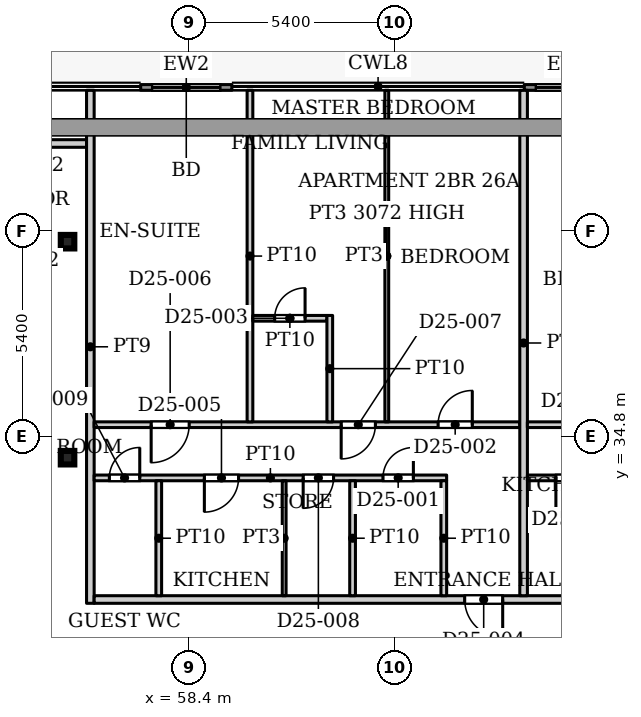
"""IFC4 building model, lengths in metres.
Left out: names, types, materials, properties, quantities, classifications, styles, units other than length and angle.
Written with IfcOpenShell. Run it as: python <this file> out.ifc"""

import sys

from ifc_helpers import new_model, si_unit, direction, frame, frame_2d, origin, origin_2d, place, context, subcontext, project, spatial, rectangle, hollow_rectangle, extrude, source, transform, mapped, element, fill, save


model = new_model("IFC4")
c1 = context("Model", 3, precision=1e-05, world=origin(), true_north=direction((0.0, 1.0)))
c2 = subcontext(c1, "Body", "Model", "MODEL_VIEW")
j1 = project(units=[si_unit("LENGTHUNIT", "METRE"), si_unit("PLANEANGLEUNIT", "RADIAN")], contexts=[c1])
p1 = place(None, origin())
s1 = spatial("IfcSite", under=j1, at=p1, CompositionType="ELEMENT")
p2 = place(p1, origin())
s2 = spatial("IfcBuilding", under=s1, at=p2, CompositionType="ELEMENT")
p3 = place(p2, frame((0.0, 0.0, 113.6)))
s3 = spatial("IfcBuildingStorey", under=s2, at=p3, CompositionType="ELEMENT", Elevation=113.6)
for number, where, z_axis, x_axis in (
    (1, (55.2, 34.232, 0.0), (0.0, 0.0, 1.0), (1.0, 0.0, 0.0)),
    (2, (55.2, 39.916, 0.0), (0.0, 0.0, 1.0), (1.0, 0.0, 0.0)),
):
    element("IfcColumn", number, at=place(p3, frame(where, z_axis=z_axis, x_axis=x_axis)), inside=s3, PredefinedType="COLUMN", context=c2, shape_type="SweptSolid", body=[
        extrude(hollow_rectangle(XDim=0.356, YDim=0.356, WallThickness=0.016, InnerFilletRadius=0.016, OuterFilletRadius=0.032, at=origin_2d()), origin(), (0.0, 0.0, 1.0), 3.9),
    ])
p4 = place(p3, frame((57.124, 43.975, 0.0), z_axis=(0.0, 0.0, 1.0), x_axis=(1.0, 0.0, 0.0)))
e3 = element("IfcWall", 3, at=p4, inside=s3, PredefinedType="SOLIDWALL", context=c2, shape_type="SweptSolid", body=[
    extrude(rectangle(XDim=2.4, YDim=0.15, at=frame_2d((1.2, 0.0))), origin(), (0.0, 0.0, 1.0), 3.75),
])
p5 = place(p4, frame((0.3, 0.0, 0.0)))
e4 = element("IfcOpeningElement", 4, at=p5, cuts=e3, PredefinedType="OPENING", context=c2, shape_type="SweptSolid", body=[
    extrude(rectangle(XDim=1.8, YDim=2.4, at=frame_2d((0.9, 1.2))), frame((0.0, 0.085, 0.0), z_axis=(0.0, -1.0, 0.0), x_axis=(1.0, 0.0, 0.0)), (0.0, 0.0, 1.0), 0.17),
])
p6 = place(p3, frame((67.218, 43.975, 0.0), z_axis=(0.0, 0.0, 1.0), x_axis=(1.0, 0.0, 0.0)))
e5 = element("IfcWall", 5, at=p6, inside=s3, PredefinedType="SOLIDWALL", context=c2, shape_type="SweptSolid", body=[
    extrude(rectangle(XDim=2.4, YDim=0.15, at=frame_2d((1.2, 0.0))), origin(), (0.0, 0.0, 1.0), 3.75),
])
p7 = place(p6, frame((0.3, 0.0, 0.0)))
e6 = element("IfcOpeningElement", 6, at=p7, cuts=e5, PredefinedType="OPENING", context=c2, shape_type="SweptSolid", body=[
    extrude(rectangle(XDim=1.8, YDim=2.4, at=frame_2d((0.9, 1.2))), frame((0.0, 0.085, 0.0), z_axis=(0.0, -1.0, 0.0), x_axis=(1.0, 0.0, 0.0)), (0.0, 0.0, 1.0), 0.17),
])
p8 = place(p3, frame((53.5, 42.5, 0.0), z_axis=(0.0, 0.0, 1.0), x_axis=(1.0, 0.0, 0.0)))
e7 = element("IfcWall", 7, at=p8, inside=s3, PredefinedType="PARTITIONING", context=c2, shape_type="SweptSolid", body=[
    extrude(rectangle(XDim=2.2, YDim=0.2, at=frame_2d((1.1, 0.0))), origin(), (0.0, 0.0, 1.0), 3.6),
])
p9 = place(p3, frame((55.8, 30.4, 0.0), z_axis=(0.0, 0.0, 1.0), x_axis=(0.0, 1.0, 0.0)))
e8 = element("IfcWall", 8, at=p9, inside=s3, PredefinedType="PARTITIONING", context=c2, shape_type="SweptSolid", body=[
    extrude(rectangle(XDim=13.5, YDim=0.2, at=frame_2d((6.75, 0.0))), origin(), (0.0, 0.0, 1.0), 3.6),
])
p10 = place(p3, frame((55.9, 30.5, 0.0), z_axis=(0.0, 0.0, 1.0), x_axis=(1.0, 0.0, 0.0)))
e9 = element("IfcWall", 9, at=p10, inside=s3, PredefinedType="PARTITIONING", context=c2, shape_type="SweptSolid", body=[
    extrude(rectangle(XDim=42.2, YDim=0.2, at=frame_2d((21.1, 0.0))), origin(), (0.0, 0.0, 1.0), 3.6),
])
p11 = place(p10, frame((9.75, 0.0, 0.0)))
e10 = element("IfcOpeningElement", 10, at=p11, cuts=e9, PredefinedType="OPENING", context=c2, shape_type="SweptSolid", body=[
    extrude(rectangle(XDim=1.0, YDim=2.1, at=frame_2d((0.5, 1.05))), frame((0.0, 0.11, 0.0), z_axis=(0.0, -1.0, 0.0), x_axis=(1.0, 0.0, 0.0)), (0.0, 0.0, 1.0), 0.22),
])
p12 = place(p10, frame((18.6, 0.0, 0.0)))
e11 = element("IfcOpeningElement", 11, at=p12, cuts=e9, PredefinedType="OPENING", context=c2, shape_type="SweptSolid", body=[
    extrude(rectangle(XDim=1.0, YDim=2.1, at=frame_2d((0.5, 1.05))), frame((0.0, 0.11, 0.0), z_axis=(0.0, -1.0, 0.0), x_axis=(1.0, 0.0, 0.0)), (0.0, 0.0, 1.0), 0.22),
])
p13 = place(p10, frame((23.4, 0.0, 0.0)))
e12 = element("IfcOpeningElement", 12, at=p13, cuts=e9, PredefinedType="OPENING", context=c2, shape_type="SweptSolid", body=[
    extrude(rectangle(XDim=1.0, YDim=2.1, at=frame_2d((0.5, 1.05))), frame((0.0, 0.11, 0.0), z_axis=(0.0, -1.0, 0.0), x_axis=(1.0, 0.0, 0.0)), (0.0, 0.0, 1.0), 0.22),
])
p14 = place(p10, frame((40.2, 0.0, 0.0)))
e13 = element("IfcOpeningElement", 13, at=p14, cuts=e9, PredefinedType="OPENING", context=c2, shape_type="SweptSolid", body=[
    extrude(rectangle(XDim=1.0, YDim=2.1, at=frame_2d((0.5, 1.05))), frame((0.0, 0.11, 0.0), z_axis=(0.0, -1.0, 0.0), x_axis=(1.0, 0.0, 0.0)), (0.0, 0.0, 1.0), 0.22),
])
p15 = place(p3, frame((55.9, 33.7, 0.0), z_axis=(0.0, 0.0, 1.0), x_axis=(1.0, 0.0, 0.0)))
e14 = element("IfcWall", 14, at=p15, inside=s3, PredefinedType="PARTITIONING", context=c2, shape_type="SweptSolid", body=[
    extrude(rectangle(XDim=9.275, YDim=0.15, at=frame_2d((4.638, 0.0))), origin(), (0.0, 0.0, 1.0), 3.6),
])
p16 = place(p15, frame((7.6, 0.0, 0.0)))
e15 = element("IfcOpeningElement", 15, at=p16, cuts=e14, PredefinedType="OPENING", context=c2, shape_type="SweptSolid", body=[
    extrude(rectangle(XDim=0.8, YDim=2.1, at=frame_2d((0.4, 1.05))), frame((0.0, 0.085, 0.0), z_axis=(0.0, -1.0, 0.0), x_axis=(1.0, 0.0, 0.0)), (0.0, 0.0, 1.0), 0.17),
])
p17 = place(p15, frame((2.9, 0.0, 0.0)))
e16 = element("IfcOpeningElement", 16, at=p17, cuts=e14, PredefinedType="OPENING", context=c2, shape_type="SweptSolid", body=[
    extrude(rectangle(XDim=0.9, YDim=2.1, at=frame_2d((0.45, 1.05))), frame((0.0, 0.085, 0.0), z_axis=(0.0, -1.0, 0.0), x_axis=(1.0, 0.0, 0.0)), (0.0, 0.0, 1.0), 0.17),
])
p18 = place(p15, frame((5.5, 0.0, 0.0)))
e17 = element("IfcOpeningElement", 17, at=p18, cuts=e14, PredefinedType="OPENING", context=c2, shape_type="SweptSolid", body=[
    extrude(rectangle(XDim=0.8, YDim=2.1, at=frame_2d((0.4, 1.05))), frame((0.0, 0.085, 0.0), z_axis=(0.0, -1.0, 0.0), x_axis=(1.0, 0.0, 0.0)), (0.0, 0.0, 1.0), 0.17),
])
p19 = place(p15, frame((0.4, 0.0, 0.0)))
e18 = element("IfcOpeningElement", 18, at=p19, cuts=e14, PredefinedType="OPENING", context=c2, shape_type="SweptSolid", body=[
    extrude(rectangle(XDim=0.8, YDim=2.1, at=frame_2d((0.4, 1.05))), frame((0.0, 0.085, 0.0), z_axis=(0.0, -1.0, 0.0), x_axis=(1.0, 0.0, 0.0)), (0.0, 0.0, 1.0), 0.17),
])
p20 = place(p3, frame((55.9, 35.1, 0.0), z_axis=(0.0, 0.0, 1.0), x_axis=(1.0, 0.0, 0.0)))
e19 = element("IfcWall", 19, at=p20, inside=s3, PredefinedType="PARTITIONING", context=c2, shape_type="SweptSolid", body=[
    extrude(rectangle(XDim=11.2, YDim=0.15, at=frame_2d((5.6, 0.0))), origin(), (0.0, 0.0, 1.0), 3.6),
])
p21 = place(p20, frame((9.05, 0.0, 0.0)))
e20 = element("IfcOpeningElement", 20, at=p21, cuts=e19, PredefinedType="OPENING", context=c2, shape_type="SweptSolid", body=[
    extrude(rectangle(XDim=0.9, YDim=2.1, at=frame_2d((0.45, 1.05))), frame((0.0, 0.085, 0.0), z_axis=(0.0, -1.0, 0.0), x_axis=(1.0, 0.0, 0.0)), (0.0, 0.0, 1.0), 0.17),
])
p22 = place(p20, frame((1.5, 0.0, 0.0)))
e21 = element("IfcOpeningElement", 21, at=p22, cuts=e19, PredefinedType="OPENING", context=c2, shape_type="SweptSolid", body=[
    extrude(rectangle(XDim=1.0, YDim=2.1, at=frame_2d((0.5, 1.05))), frame((0.0, 0.085, 0.0), z_axis=(0.0, -1.0, 0.0), x_axis=(1.0, 0.0, 0.0)), (0.0, 0.0, 1.0), 0.17),
])
p23 = place(p20, frame((6.5, 0.0, 0.0)))
e22 = element("IfcOpeningElement", 22, at=p23, cuts=e19, PredefinedType="OPENING", context=c2, shape_type="SweptSolid", body=[
    extrude(rectangle(XDim=0.9, YDim=2.1, at=frame_2d((0.45, 1.05))), frame((0.0, 0.085, 0.0), z_axis=(0.0, -1.0, 0.0), x_axis=(1.0, 0.0, 0.0)), (0.0, 0.0, 1.0), 0.17),
])
p24 = place(p3, frame((57.6, 30.6, 0.0), z_axis=(0.0, 0.0, 1.0), x_axis=(0.0, 1.0, 0.0)))
e23 = element("IfcWall", 23, at=p24, inside=s3, PredefinedType="PARTITIONING", context=c2, shape_type="SweptSolid", body=[
    extrude(rectangle(XDim=3.025, YDim=0.15, at=frame_2d((1.512, 0.0))), origin(), (0.0, 0.0, 1.0), 3.6),
])
p25 = place(p3, frame((60.0, 35.175, 0.0), z_axis=(0.0, 0.0, 1.0), x_axis=(0.0, 1.0, 0.0)))
e24 = element("IfcWall", 24, at=p25, inside=s3, PredefinedType="PARTITIONING", context=c2, shape_type="SweptSolid", body=[
    extrude(rectangle(XDim=8.725, YDim=0.15, at=frame_2d((4.362, 0.0))), origin(), (0.0, 0.0, 1.0), 3.6),
])
p26 = place(p3, frame((60.075, 37.9, 0.0), z_axis=(0.0, 0.0, 1.0), x_axis=(1.0, 0.0, 0.0)))
e25 = element("IfcWall", 25, at=p26, inside=s3, PredefinedType="PARTITIONING", context=c2, shape_type="SweptSolid", body=[
    extrude(rectangle(XDim=1.95, YDim=0.15, at=frame_2d((0.975, 0.0))), origin(), (0.0, 0.0, 1.0), 3.6),
])
p27 = place(p26, frame((0.575, 0.0, 0.0)))
e26 = element("IfcOpeningElement", 26, at=p27, cuts=e25, PredefinedType="OPENING", context=c2, shape_type="SweptSolid", body=[
    extrude(rectangle(XDim=0.8, YDim=2.1, at=frame_2d((0.4, 1.05))), frame((0.0, 0.085, 0.0), z_axis=(0.0, -1.0, 0.0), x_axis=(1.0, 0.0, 0.0)), (0.0, 0.0, 1.0), 0.17),
])
p28 = place(p3, frame((60.9, 30.6, 0.0), z_axis=(0.0, 0.0, 1.0), x_axis=(0.0, 1.0, 0.0)))
e27 = element("IfcWall", 27, at=p28, inside=s3, PredefinedType="PARTITIONING", context=c2, shape_type="SweptSolid", body=[
    extrude(rectangle(XDim=3.025, YDim=0.1, at=frame_2d((1.512, 0.0))), origin(), (0.0, 0.0, 1.0), 3.6),
])
p29 = place(p3, frame((62.1, 35.175, 0.0), z_axis=(0.0, 0.0, 1.0), x_axis=(0.0, 1.0, 0.0)))
e28 = element("IfcWall", 28, at=p29, inside=s3, PredefinedType="PARTITIONING", context=c2, shape_type="SweptSolid", body=[
    extrude(rectangle(XDim=2.8, YDim=0.15, at=frame_2d((1.4, 0.0))), origin(), (0.0, 0.0, 1.0), 3.6),
])
p30 = place(p3, frame((62.7, 30.6, 0.0), z_axis=(0.0, 0.0, 1.0), x_axis=(0.0, 1.0, 0.0)))
e29 = element("IfcWall", 29, at=p30, inside=s3, PredefinedType="PARTITIONING", context=c2, shape_type="SweptSolid", body=[
    extrude(rectangle(XDim=3.025, YDim=0.15, at=frame_2d((1.512, 0.0))), origin(), (0.0, 0.0, 1.0), 3.6),
])
p31 = place(p3, frame((63.6, 35.175, 0.0), z_axis=(0.0, 0.0, 1.0), x_axis=(0.0, 1.0, 0.0)))
e30 = element("IfcWall", 30, at=p31, inside=s3, PredefinedType="PARTITIONING", context=c2, shape_type="SweptSolid", body=[
    extrude(rectangle(XDim=8.725, YDim=0.1, at=frame_2d((4.362, 0.0))), origin(), (0.0, 0.0, 1.0), 3.072),
])
p32 = place(p3, frame((65.1, 30.6, 0.0), z_axis=(0.0, 0.0, 1.0), x_axis=(0.0, 1.0, 0.0)))
e31 = element("IfcWall", 31, at=p32, inside=s3, PredefinedType="PARTITIONING", context=c2, shape_type="SweptSolid", body=[
    extrude(rectangle(XDim=3.025, YDim=0.15, at=frame_2d((1.512, 0.0))), origin(), (0.0, 0.0, 1.0), 3.6),
])
p33 = place(p3, frame((67.2, 30.6, 0.0), z_axis=(0.0, 0.0, 1.0), x_axis=(0.0, 1.0, 0.0)))
e32 = element("IfcWall", 32, at=p33, inside=s3, PredefinedType="PARTITIONING", context=c2, shape_type="SweptSolid", body=[
    extrude(rectangle(XDim=13.3, YDim=0.2, at=frame_2d((6.65, 0.0))), origin(), (0.0, 0.0, 1.0), 3.6),
])
p34 = place(p3, frame((67.3, 33.7, 0.0), z_axis=(0.0, 0.0, 1.0), x_axis=(1.0, 0.0, 0.0)))
e33 = element("IfcWall", 33, at=p34, inside=s3, PredefinedType="PARTITIONING", context=c2, shape_type="SweptSolid", body=[
    extrude(rectangle(XDim=6.875, YDim=0.15, at=frame_2d((3.438, 0.0))), origin(), (0.0, 0.0, 1.0), 3.6),
])
p35 = place(p34, frame((3.7, 0.0, 0.0)))
e34 = element("IfcOpeningElement", 34, at=p35, cuts=e33, PredefinedType="OPENING", context=c2, shape_type="SweptSolid", body=[
    extrude(rectangle(XDim=0.8, YDim=2.1, at=frame_2d((0.4, 1.05))), frame((0.0, 0.085, 0.0), z_axis=(0.0, -1.0, 0.0), x_axis=(1.0, 0.0, 0.0)), (0.0, 0.0, 1.0), 0.17),
])
p36 = place(p34, frame((0.75, 0.0, 0.0)))
e35 = element("IfcOpeningElement", 35, at=p36, cuts=e33, PredefinedType="OPENING", context=c2, shape_type="SweptSolid", body=[
    extrude(rectangle(XDim=0.9, YDim=2.1, at=frame_2d((0.45, 1.05))), frame((0.0, 0.085, 0.0), z_axis=(0.0, -1.0, 0.0), x_axis=(1.0, 0.0, 0.0)), (0.0, 0.0, 1.0), 0.17),
])
p37 = place(p34, frame((5.65, 0.0, 0.0)))
e36 = element("IfcOpeningElement", 36, at=p37, cuts=e33, PredefinedType="OPENING", context=c2, shape_type="SweptSolid", body=[
    extrude(rectangle(XDim=0.8, YDim=2.1, at=frame_2d((0.4, 1.05))), frame((0.0, 0.085, 0.0), z_axis=(0.0, -1.0, 0.0), x_axis=(1.0, 0.0, 0.0)), (0.0, 0.0, 1.0), 0.17),
])
p38 = place(p3, frame((67.3, 35.1, 0.0), z_axis=(0.0, 0.0, 1.0), x_axis=(1.0, 0.0, 0.0)))
e37 = element("IfcWall", 37, at=p38, inside=s3, PredefinedType="PARTITIONING", context=c2, shape_type="SweptSolid", body=[
    extrude(rectangle(XDim=8.5, YDim=0.15, at=frame_2d((4.25, 0.0))), origin(), (0.0, 0.0, 1.0), 3.6),
])
p39 = place(p38, frame((1.0, 0.0, 0.0)))
e38 = element("IfcOpeningElement", 38, at=p39, cuts=e37, PredefinedType="OPENING", context=c2, shape_type="SweptSolid", body=[
    extrude(rectangle(XDim=0.9, YDim=2.1, at=frame_2d((0.45, 1.05))), frame((0.0, 0.085, 0.0), z_axis=(0.0, -1.0, 0.0), x_axis=(1.0, 0.0, 0.0)), (0.0, 0.0, 1.0), 0.17),
])
p40 = place(p38, frame((5.7, 0.0, 0.0)))
e39 = element("IfcOpeningElement", 39, at=p40, cuts=e37, PredefinedType="OPENING", context=c2, shape_type="SweptSolid", body=[
    extrude(rectangle(XDim=1.0, YDim=2.1, at=frame_2d((0.5, 1.05))), frame((0.0, 0.085, 0.0), z_axis=(0.0, -1.0, 0.0), x_axis=(1.0, 0.0, 0.0)), (0.0, 0.0, 1.0), 0.17),
])
m1 = source(origin(), c2, "Body", "SweptSolid", [
    extrude(rectangle(XDim=1.8, YDim=2.4, at=frame_2d((0.9, 1.2))), frame((0.0, 0.025, 0.0), z_axis=(0.0, -1.0, 0.0), x_axis=(1.0, 0.0, 0.0)), (0.0, 0.0, 1.0), 0.05),
])
p41 = place(p5, origin())
e40 = element("IfcDoor", 40, at=p41, inside=s3, OperationType="SLIDING_TO_LEFT", PredefinedType="DOOR", context=c2, shape_type="MappedRepresentation", body=[
    mapped(m1, transform((0.0, 0.0, 0.0), x_axis=(1.0, 0.0, 0.0), y_axis=(0.0, 1.0, 0.0), z_axis=(0.0, 0.0, 1.0), scale=1.0)),
])
fill(e4, e40)
p42 = place(p7, origin())
e41 = element("IfcDoor", 41, at=p42, inside=s3, OperationType="SLIDING_TO_LEFT", PredefinedType="DOOR", context=c2, shape_type="MappedRepresentation", body=[
    mapped(m1, transform((0.0, 0.0, 0.0), x_axis=(1.0, 0.0, 0.0), y_axis=(0.0, 1.0, 0.0), z_axis=(0.0, 0.0, 1.0), scale=1.0)),
])
fill(e6, e41)
m2 = source(origin(), c2, "Body", "SweptSolid", [
    extrude(rectangle(XDim=0.8, YDim=2.1, at=frame_2d((0.4, 1.05))), frame((0.0, 0.025, 0.0), z_axis=(0.0, -1.0, 0.0), x_axis=(1.0, 0.0, 0.0)), (0.0, 0.0, 1.0), 0.05),
])
p43 = place(p16, origin())
e42 = element("IfcDoor", 42, at=p43, inside=s3, OperationType="SINGLE_SWING_LEFT", PredefinedType="DOOR", context=c2, shape_type="MappedRepresentation", body=[
    mapped(m2, transform((0.0, 0.0, 0.0), x_axis=(1.0, 0.0, 0.0), y_axis=(0.0, 1.0, 0.0), z_axis=(0.0, 0.0, 1.0), scale=1.0)),
])
fill(e15, e42)
m3 = source(origin(), c2, "Body", "SweptSolid", [
    extrude(rectangle(XDim=0.9, YDim=2.1, at=frame_2d((0.45, 1.05))), frame((0.0, 0.025, 0.0), z_axis=(0.0, -1.0, 0.0), x_axis=(1.0, 0.0, 0.0)), (0.0, 0.0, 1.0), 0.05),
])
p44 = place(p21, origin())
e43 = element("IfcDoor", 43, at=p44, inside=s3, OperationType="SINGLE_SWING_LEFT", PredefinedType="DOOR", context=c2, shape_type="MappedRepresentation", body=[
    mapped(m3, transform((0.0, 0.0, 0.0), x_axis=(1.0, 0.0, 0.0), y_axis=(0.0, 1.0, 0.0), z_axis=(0.0, 0.0, 1.0), scale=1.0)),
])
fill(e20, e43)
p45 = place(p27, origin())
e44 = element("IfcDoor", 44, at=p45, inside=s3, OperationType="SINGLE_SWING_LEFT", PredefinedType="DOOR", context=c2, shape_type="MappedRepresentation", body=[
    mapped(m2, transform((0.0, 0.0, 0.0), x_axis=(1.0, 0.0, 0.0), y_axis=(0.0, 1.0, 0.0), z_axis=(0.0, 0.0, 1.0), scale=1.0)),
])
fill(e26, e44)
m4 = source(origin(), c2, "Body", "SweptSolid", [
    extrude(rectangle(XDim=1.0, YDim=2.1, at=frame_2d((0.5, 1.05))), frame((0.0, 0.025, 0.0), z_axis=(0.0, -1.0, 0.0), x_axis=(1.0, 0.0, 0.0)), (0.0, 0.0, 1.0), 0.05),
])
p46 = place(p11, origin())
e45 = element("IfcDoor", 45, at=p46, inside=s3, OperationType="SINGLE_SWING_RIGHT", PredefinedType="DOOR", context=c2, shape_type="MappedRepresentation", body=[
    mapped(m4, transform((0.0, 0.0, 0.0), x_axis=(1.0, 0.0, 0.0), y_axis=(0.0, 1.0, 0.0), z_axis=(0.0, 0.0, 1.0), scale=1.0)),
])
fill(e10, e45)
p47 = place(p17, origin())
e46 = element("IfcDoor", 46, at=p47, inside=s3, OperationType="SINGLE_SWING_RIGHT", PredefinedType="DOOR", context=c2, shape_type="MappedRepresentation", body=[
    mapped(m3, transform((0.0, 0.0, 0.0), x_axis=(1.0, 0.0, 0.0), y_axis=(0.0, 1.0, 0.0), z_axis=(0.0, 0.0, 1.0), scale=1.0)),
])
fill(e16, e46)
m5 = source(origin(), c2, "Body", "SweptSolid", [
    extrude(rectangle(XDim=1.0, YDim=2.1, at=frame_2d((0.5, 1.05))), frame((0.0, 0.025, 0.0), z_axis=(0.0, -1.0, 0.0), x_axis=(1.0, 0.0, 0.0)), (0.0, 0.0, 1.0), 0.05),
])
p48 = place(p22, origin())
e47 = element("IfcDoor", 47, at=p48, inside=s3, OperationType="SINGLE_SWING_RIGHT", PredefinedType="DOOR", context=c2, shape_type="MappedRepresentation", body=[
    mapped(m5, transform((0.0, 0.0, 0.0), x_axis=(1.0, 0.0, 0.0), y_axis=(0.0, 1.0, 0.0), z_axis=(0.0, 0.0, 1.0), scale=1.0)),
])
fill(e21, e47)
p49 = place(p23, origin())
e48 = element("IfcDoor", 48, at=p49, inside=s3, OperationType="SINGLE_SWING_RIGHT", PredefinedType="DOOR", context=c2, shape_type="MappedRepresentation", body=[
    mapped(m3, transform((0.0, 0.0, 0.0), x_axis=(1.0, 0.0, 0.0), y_axis=(0.0, 1.0, 0.0), z_axis=(0.0, 0.0, 1.0), scale=1.0)),
])
fill(e22, e48)
p50 = place(p18, origin())
e49 = element("IfcDoor", 49, at=p50, inside=s3, OperationType="SINGLE_SWING_RIGHT", PredefinedType="DOOR", context=c2, shape_type="MappedRepresentation", body=[
    mapped(m2, transform((0.0, 0.0, 0.0), x_axis=(1.0, 0.0, 0.0), y_axis=(0.0, 1.0, 0.0), z_axis=(0.0, 0.0, 1.0), scale=1.0)),
])
fill(e17, e49)
p51 = place(p19, origin())
e50 = element("IfcDoor", 50, at=p51, inside=s3, OperationType="SINGLE_SWING_LEFT", PredefinedType="DOOR", context=c2, shape_type="MappedRepresentation", body=[
    mapped(m2, transform((0.0, 0.0, 0.0), x_axis=(1.0, 0.0, 0.0), y_axis=(0.0, 1.0, 0.0), z_axis=(0.0, 0.0, 1.0), scale=1.0)),
])
fill(e18, e50)
p52 = place(p36, origin())
e51 = element("IfcDoor", 51, at=p52, inside=s3, OperationType="SINGLE_SWING_RIGHT", PredefinedType="DOOR", context=c2, shape_type="MappedRepresentation", body=[
    mapped(m3, transform((0.0, 0.0, 0.0), x_axis=(1.0, 0.0, 0.0), y_axis=(0.0, 1.0, 0.0), z_axis=(0.0, 0.0, 1.0), scale=1.0)),
])
fill(e35, e51)
save(model, sys.argv[1])
